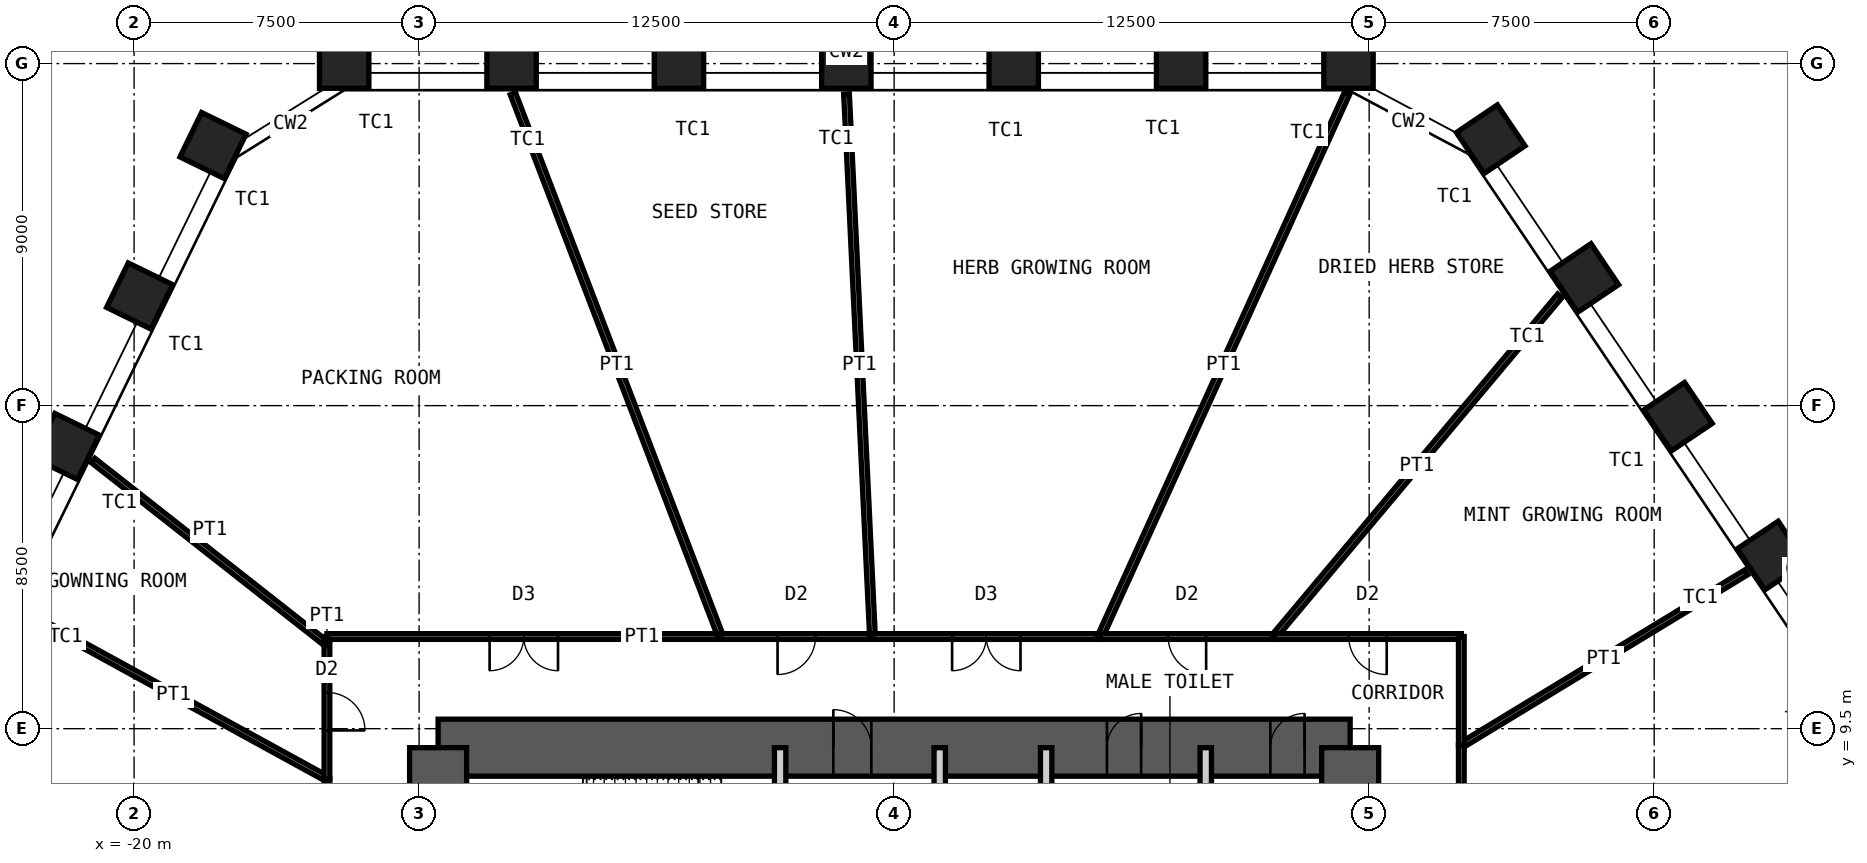
"""IFC4 building model, lengths in metres.
Left out: names, types, materials, properties, quantities, classifications, styles, units other than length and angle.
Written with IfcOpenShell. Run it as: python <this file> out.ifc"""

import sys

from ifc_helpers import new_model, si_unit, direction, frame, frame_2d, origin, origin_2d, place, context, subcontext, project, spatial, rectangle, hollow_rectangle, extrude, element, fill, save


model = new_model("IFC4")
c1 = context("Model", 3, precision=1e-05, world=origin(), true_north=direction((0.0, 1.0)))
c2 = subcontext(c1, "Body", "Model", "MODEL_VIEW")
j1 = project(units=[si_unit("LENGTHUNIT", "METRE"), si_unit("PLANEANGLEUNIT", "RADIAN")], contexts=[c1])
p1 = place(None, origin())
s1 = spatial("IfcSite", under=j1, at=p1, CompositionType="ELEMENT")
p2 = place(p1, origin())
s2 = spatial("IfcBuilding", under=s1, at=p2, CompositionType="ELEMENT")
p3 = place(p2, frame((0.0, 0.0, 52.0)))
s3 = spatial("IfcBuildingStorey", under=s2, at=p3, CompositionType="ELEMENT", Elevation=52.0)
for number, where, z_axis, x_axis in (
    (1, (-14.471, 27.0, 0.0), (0.0, 0.0, 1.0), (-1.0, 0.0, 0.0)),
    (2, (-10.067, 27.0, 0.0), (0.0, 0.0, 1.0), (-1.0, 0.0, 0.0)),
    (3, (-5.662, 27.0, 0.0), (0.0, 0.0, 1.0), (-1.0, 0.0, 0.0)),
    (4, (-1.258, 27.0, 0.0), (0.0, 0.0, 1.0), (-1.0, 0.0, 0.0)),
    (5, (3.147, 27.0, 0.0), (0.0, 0.0, 1.0), (-1.0, 0.0, 0.0)),
    (6, (7.552, 27.0, 0.0), (0.0, 0.0, 1.0), (-1.0, 0.0, 0.0)),
    (7, (11.956, 27.0, 0.0), (0.0, 0.0, 1.0), (-1.0, 0.0, 0.0)),
    (8, (15.698, 25.01, 0.0), (0.0, 0.0, 1.0), (-0.559, 0.829, 0.0)),
    (9, (18.161, 21.359, 0.0), (0.0, 0.0, 1.0), (-0.559, 0.829, 0.0)),
    (10, (20.624, 17.707, 0.0), (0.0, 0.0, 1.0), (-0.559, 0.829, 0.0)),
    (11, (23.087, 14.056, 0.0), (0.0, 0.0, 1.0), (-0.559, 0.829, 0.0)),
    (12, (-21.785, 16.925, 0.0), (0.0, 0.0, 1.0), (-0.438, -0.899, 0.0)),
    (13, (-19.854, 20.884, 0.0), (0.0, 0.0, 1.0), (-0.438, -0.899, 0.0)),
    (14, (-17.924, 24.843, 0.0), (0.0, 0.0, 1.0), (-0.438, -0.899, 0.0)),
):
    element("IfcColumn", number, at=place(p3, frame(where, z_axis=z_axis, x_axis=x_axis)), inside=s3, PredefinedType="COLUMN", context=c2, shape_type="SweptSolid", body=[
        extrude(hollow_rectangle(XDim=1.3, YDim=1.3, WallThickness=0.1, at=origin_2d()), origin(), (0.0, 0.0, 1.0), 5.0),
    ])
p4 = place(p3, frame((-12.0, 9.0, 0.0), z_axis=(0.0, 0.0, 1.0), x_axis=(1.0, 0.0, 0.0)))
e15 = element("IfcWall", 15, at=p4, inside=s3, PredefinedType="SHEAR", context=c2, shape_type="SweptSolid", body=[
    extrude(rectangle(XDim=24.0, YDim=1.5, at=frame_2d((12.0, 0.0))), origin(), (0.0, 0.0, 1.0), 5.0),
])
p5 = place(p4, frame((10.4, 0.0, 0.0)))
e16 = element("IfcOpeningElement", 16, at=p5, cuts=e15, PredefinedType="OPENING", context=c2, shape_type="SweptSolid", body=[
    extrude(rectangle(XDim=1.0, YDim=2.1, at=frame_2d((0.5, 1.05))), frame((0.0, 0.76, 0.0), z_axis=(0.0, -1.0, 0.0), x_axis=(1.0, 0.0, 0.0)), (0.0, 0.0, 1.0), 1.52),
])
p6 = place(p4, frame((17.6, 0.0, 0.0)))
e17 = element("IfcOpeningElement", 17, at=p6, cuts=e15, PredefinedType="OPENING", context=c2, shape_type="SweptSolid", body=[
    extrude(rectangle(XDim=0.9, YDim=2.1, at=frame_2d((0.45, 1.05))), frame((0.0, 0.76, 0.0), z_axis=(0.0, -1.0, 0.0), x_axis=(1.0, 0.0, 0.0)), (0.0, 0.0, 1.0), 1.52),
])
p7 = place(p4, frame((21.9, 0.0, 0.0)))
e18 = element("IfcOpeningElement", 18, at=p7, cuts=e15, PredefinedType="OPENING", context=c2, shape_type="SweptSolid", body=[
    extrude(rectangle(XDim=0.9, YDim=2.1, at=frame_2d((0.45, 1.05))), frame((0.0, 0.76, 0.0), z_axis=(0.0, -1.0, 0.0), x_axis=(1.0, 0.0, 0.0)), (0.0, 0.0, 1.0), 1.52),
])
p8 = place(p3, frame((12.0, -9.0, 0.0), z_axis=(0.0, 0.0, 1.0), x_axis=(0.0, 1.0, 0.0)))
e19 = element("IfcWall", 19, at=p8, inside=s3, PredefinedType="SHEAR", context=c2, shape_type="SweptSolid", body=[
    extrude(rectangle(XDim=18.0, YDim=1.5, at=frame_2d((9.0, 0.0))), origin(), (0.0, 0.0, 1.0), 5.0),
])
p9 = place(p8, frame((8.1, 0.0, 0.0)))
e20 = element("IfcOpeningElement", 20, at=p9, cuts=e19, PredefinedType="OPENING", context=c2, shape_type="SweptSolid", body=[
    extrude(rectangle(XDim=1.8, YDim=2.1, at=frame_2d((0.9, 1.05))), frame((0.0, 0.76, 0.0), z_axis=(0.0, -1.0, 0.0), x_axis=(1.0, 0.0, 0.0)), (0.0, 0.0, 1.0), 1.52),
])
p10 = place(p3, frame((-12.0, -9.0, 0.0), z_axis=(0.0, 0.0, 1.0), x_axis=(0.0, 1.0, 0.0)))
e21 = element("IfcWall", 21, at=p10, inside=s3, PredefinedType="SHEAR", context=c2, shape_type="SweptSolid", body=[
    extrude(rectangle(XDim=18.0, YDim=1.5, at=frame_2d((9.0, 0.0))), origin(), (0.0, 0.0, 1.0), 5.0),
])
p11 = place(p10, frame((8.1, 0.0, 0.0)))
e22 = element("IfcOpeningElement", 22, at=p11, cuts=e21, PredefinedType="OPENING", context=c2, shape_type="SweptSolid", body=[
    extrude(rectangle(XDim=1.8, YDim=2.1, at=frame_2d((0.9, 1.05))), frame((0.0, 0.76, 0.0), z_axis=(0.0, -1.0, 0.0), x_axis=(1.0, 0.0, 0.0)), (0.0, 0.0, 1.0), 1.52),
])
p12 = place(p3, frame((-3.0, 5.15, 0.0), z_axis=(0.0, 0.0, 1.0), x_axis=(0.0, 1.0, 0.0)))
e23 = element("IfcWall", 23, at=p12, inside=s3, PredefinedType="PARTITIONING", context=c2, shape_type="SweptSolid", body=[
    extrude(rectangle(XDim=3.85, YDim=0.3, at=frame_2d((1.925, 0.0))), origin(), (0.0, 0.0, 1.0), 4.78),
])
p13 = place(p12, frame((1.425, 0.0, 0.0)))
e24 = element("IfcOpeningElement", 24, at=p13, cuts=e23, PredefinedType="OPENING", context=c2, shape_type="SweptSolid", body=[
    extrude(rectangle(XDim=1.0, YDim=2.1, at=frame_2d((0.5, 1.05))), frame((0.0, 0.16, 0.0), z_axis=(0.0, -1.0, 0.0), x_axis=(1.0, 0.0, 0.0)), (0.0, 0.0, 1.0), 0.32),
])
p14 = place(p3, frame((1.2, 5.15, 0.0), z_axis=(0.0, 0.0, 1.0), x_axis=(0.0, 1.0, 0.0)))
e25 = element("IfcWall", 25, at=p14, inside=s3, PredefinedType="PARTITIONING", context=c2, shape_type="SweptSolid", body=[
    extrude(rectangle(XDim=3.85, YDim=0.3, at=frame_2d((1.925, 0.0))), origin(), (0.0, 0.0, 1.0), 4.78),
])
p15 = place(p14, frame((1.375, 0.0, 0.0)))
e26 = element("IfcOpeningElement", 26, at=p15, cuts=e25, PredefinedType="OPENING", context=c2, shape_type="SweptSolid", body=[
    extrude(rectangle(XDim=1.1, YDim=2.4, at=frame_2d((0.55, 1.2))), frame((0.0, 0.16, 0.0), z_axis=(0.0, -1.0, 0.0), x_axis=(1.0, 0.0, 0.0)), (0.0, 0.0, 1.0), 0.32),
])
for number, where, z_axis, x_axis in (
    (27, (4.0, 5.15, 0.0), (0.0, 0.0, 1.0), (0.0, 1.0, 0.0)),
    (28, (8.2, 5.15, 0.0), (0.0, 0.0, 1.0), (0.0, 1.0, 0.0)),
):
    element("IfcWall", number, at=place(p3, frame(where, z_axis=z_axis, x_axis=x_axis)), inside=s3, PredefinedType="PARTITIONING", context=c2, shape_type="SweptSolid", body=[
        extrude(rectangle(XDim=3.85, YDim=0.3, at=frame_2d((1.925, 0.0))), origin(), (0.0, 0.0, 1.0), 4.78),
    ])
p16 = place(p3, frame((22.421, 13.612, 0.0), z_axis=(0.0, 0.0, 1.0), x_axis=(-0.854791484761, -0.518971596121, 0.0)))
e29 = element("IfcWall", 29, at=p16, inside=s3, PredefinedType="PARTITIONING", context=c2, shape_type="SweptSolid", body=[
    extrude(rectangle(XDim=8.77, YDim=0.15, at=frame_2d((4.385, 0.0))), origin(), (0.0, 0.0, 1.0), 3.7),
])
p17 = place(p3, frame((14.925, 9.061, 0.0), z_axis=(0.0, 0.0, 1.0), x_axis=(0.0, -1.0, 0.0)))
e30 = element("IfcWall", 30, at=p17, inside=s3, PredefinedType="PARTITIONING", context=c2, shape_type="SweptSolid", body=[
    extrude(rectangle(XDim=11.439, YDim=0.15, at=frame_2d((5.72, 0.0))), origin(), (0.0, 0.0, 1.0), 4.8),
])
p18 = place(p17, frame((4.82, 0.0, 0.0)))
e31 = element("IfcOpeningElement", 31, at=p18, cuts=e30, PredefinedType="OPENING", context=c2, shape_type="SweptSolid", body=[
    extrude(rectangle(XDim=1.8, YDim=2.4, at=frame_2d((0.9, 1.2))), frame((0.0, 0.085, 0.0), z_axis=(0.0, -1.0, 0.0), x_axis=(1.0, 0.0, 0.0)), (0.0, 0.0, 1.0), 0.17),
])
p19 = place(p3, frame((-14.925, -9.596, 0.0), z_axis=(0.0, 0.0, 1.0), x_axis=(0.0, 1.0, 0.0)))
e32 = element("IfcWall", 32, at=p19, inside=s3, PredefinedType="PARTITIONING", context=c2, shape_type="SweptSolid", body=[
    extrude(rectangle(XDim=17.78, YDim=0.15, at=frame_2d((8.89, 0.0))), origin(), (0.0, 0.0, 1.0), 4.8),
])
p20 = place(p19, frame((7.99, 0.0, 0.0)))
e33 = element("IfcOpeningElement", 33, at=p20, cuts=e32, PredefinedType="OPENING", context=c2, shape_type="SweptSolid", body=[
    extrude(rectangle(XDim=1.8, YDim=2.4, at=frame_2d((0.9, 1.2))), frame((0.0, 0.085, 0.0), z_axis=(0.0, -1.0, 0.0), x_axis=(1.0, 0.0, 0.0)), (0.0, 0.0, 1.0), 0.17),
])
p21 = place(p3, frame((-22.999, 12.612, 0.0), z_axis=(0.0, 0.0, 1.0), x_axis=(0.876826470608, -0.480806967963, 0.0)))
e34 = element("IfcWall", 34, at=p21, inside=s3, PredefinedType="PARTITIONING", context=c2, shape_type="SweptSolid", body=[
    extrude(rectangle(XDim=9.208, YDim=0.15, at=frame_2d((4.604, 0.0))), origin(), (0.0, 0.0, 1.0), 3.7),
])
p22 = place(p3, frame((-14.925, 8.184, 0.0), z_axis=(0.0, 0.0, 1.0), x_axis=(0.0, 1.0, 0.0)))
e35 = element("IfcWall", 35, at=p22, inside=s3, PredefinedType="PARTITIONING", context=c2, shape_type="SweptSolid", body=[
    extrude(rectangle(XDim=3.54, YDim=0.15, at=frame_2d((1.77, 0.0))), origin(), (0.0, 0.0, 1.0), 4.8),
])
p23 = place(p22, frame((1.27, 0.0, 0.0)))
e36 = element("IfcOpeningElement", 36, at=p23, cuts=e35, PredefinedType="OPENING", context=c2, shape_type="SweptSolid", body=[
    extrude(rectangle(XDim=1.0, YDim=2.4, at=frame_2d((0.5, 1.2))), frame((0.0, 0.085, 0.0), z_axis=(0.0, -1.0, 0.0), x_axis=(1.0, 0.0, 0.0)), (0.0, 0.0, 1.0), 0.17),
])
p24 = place(p3, frame((-21.077, 16.557, 0.0), z_axis=(0.0, 0.0, 1.0), x_axis=(0.78639413325, -0.617725074115, 0.0)))
e37 = element("IfcWall", 37, at=p24, inside=s3, PredefinedType="PARTITIONING", context=c2, shape_type="SweptSolid", body=[
    extrude(rectangle(XDim=7.823, YDim=0.15, at=frame_2d((3.912, 0.0))), origin(), (0.0, 0.0, 1.0), 3.7),
])
p25 = place(p3, frame((-14.925, 11.819, 0.0), z_axis=(0.0, 0.0, 1.0), x_axis=(0.0, 1.0, 0.0)))
e38 = element("IfcWall", 38, at=p25, inside=s3, PredefinedType="PARTITIONING", context=c2, shape_type="SweptSolid", body=[
    extrude(rectangle(XDim=0.106, YDim=0.15, at=frame_2d((0.053, 0.0))), origin(), (0.0, 0.0, 1.0), 4.8),
])
p26 = place(p3, frame((-14.925, 11.925, 0.0), z_axis=(0.0, 0.0, 1.0), x_axis=(1.0, 0.0, 0.0)))
e39 = element("IfcWall", 39, at=p26, inside=s3, PredefinedType="PARTITIONING", context=c2, shape_type="SweptSolid", body=[
    extrude(rectangle(XDim=10.361, YDim=0.15, at=frame_2d((5.18, 0.0))), origin(), (0.0, 0.0, 1.0), 4.8),
])
p27 = place(p26, frame((4.28, 0.0, 0.0)))
e40 = element("IfcOpeningElement", 40, at=p27, cuts=e39, PredefinedType="OPENING", context=c2, shape_type="SweptSolid", body=[
    extrude(rectangle(XDim=1.8, YDim=2.4, at=frame_2d((0.9, 1.2))), frame((0.0, 0.085, 0.0), z_axis=(0.0, -1.0, 0.0), x_axis=(1.0, 0.0, 0.0)), (0.0, 0.0, 1.0), 0.17),
])
p28 = place(p3, frame((-10.031, 26.207, 0.0), z_axis=(0.0, 0.0, 1.0), x_axis=(0.357478701909, -0.933921290946, 0.0)))
e41 = element("IfcWall", 41, at=p28, inside=s3, PredefinedType="PARTITIONING", context=c2, shape_type="SweptSolid", body=[
    extrude(rectangle(XDim=15.292, YDim=0.15, at=frame_2d((7.646, 0.0))), origin(), (0.0, 0.0, 1.0), 3.7),
])
p29 = place(p3, frame((-4.564, 11.925, 0.0), z_axis=(0.0, 0.0, 1.0), x_axis=(1.0, 0.0, 0.0)))
e42 = element("IfcWall", 42, at=p29, inside=s3, PredefinedType="PARTITIONING", context=c2, shape_type="SweptSolid", body=[
    extrude(rectangle(XDim=3.994, YDim=0.15, at=frame_2d((1.997, 0.0))), origin(), (0.0, 0.0, 1.0), 4.8),
])
p30 = place(p29, frame((1.497, 0.0, 0.0)))
e43 = element("IfcOpeningElement", 43, at=p30, cuts=e42, PredefinedType="OPENING", context=c2, shape_type="SweptSolid", body=[
    extrude(rectangle(XDim=1.0, YDim=2.4, at=frame_2d((0.5, 1.2))), frame((0.0, 0.085, 0.0), z_axis=(0.0, -1.0, 0.0), x_axis=(1.0, 0.0, 0.0)), (0.0, 0.0, 1.0), 0.17),
])
p31 = place(p3, frame((-1.253, 26.2, 0.0), z_axis=(0.0, 0.0, 1.0), x_axis=(0.047763998943, -0.998858648861, 0.0)))
e44 = element("IfcWall", 44, at=p31, inside=s3, PredefinedType="PARTITIONING", context=c2, shape_type="SweptSolid", body=[
    extrude(rectangle(XDim=14.292, YDim=0.15, at=frame_2d((7.146, 0.0))), origin(), (0.0, 0.0, 1.0), 3.7),
])
p32 = place(p3, frame((-0.57, 11.925, 0.0), z_axis=(0.0, 0.0, 1.0), x_axis=(1.0, 0.0, 0.0)))
e45 = element("IfcWall", 45, at=p32, inside=s3, PredefinedType="PARTITIONING", context=c2, shape_type="SweptSolid", body=[
    extrude(rectangle(XDim=5.991, YDim=0.15, at=frame_2d((2.996, 0.0))), origin(), (0.0, 0.0, 1.0), 4.8),
])
p33 = place(p32, frame((2.096, 0.0, 0.0)))
e46 = element("IfcOpeningElement", 46, at=p33, cuts=e45, PredefinedType="OPENING", context=c2, shape_type="SweptSolid", body=[
    extrude(rectangle(XDim=1.8, YDim=2.4, at=frame_2d((0.9, 1.2))), frame((0.0, 0.085, 0.0), z_axis=(0.0, -1.0, 0.0), x_axis=(1.0, 0.0, 0.0)), (0.0, 0.0, 1.0), 0.17),
])
p34 = place(p3, frame((11.915, 26.209, 0.0), z_axis=(0.0, 0.0, 1.0), x_axis=(-0.4138533524, -0.910343563007, 0.0)))
e47 = element("IfcWall", 47, at=p34, inside=s3, PredefinedType="PARTITIONING", context=c2, shape_type="SweptSolid", body=[
    extrude(rectangle(XDim=15.691, YDim=0.15, at=frame_2d((7.845, 0.0))), origin(), (0.0, 0.0, 1.0), 3.7),
])
p35 = place(p3, frame((5.421, 11.925, 0.0), z_axis=(0.0, 0.0, 1.0), x_axis=(1.0, 0.0, 0.0)))
e48 = element("IfcWall", 48, at=p35, inside=s3, PredefinedType="PARTITIONING", context=c2, shape_type="SweptSolid", body=[
    extrude(rectangle(XDim=4.578, YDim=0.15, at=frame_2d((2.289, 0.0))), origin(), (0.0, 0.0, 1.0), 4.8),
])
p36 = place(p35, frame((1.789, 0.0, 0.0)))
e49 = element("IfcOpeningElement", 49, at=p36, cuts=e48, PredefinedType="OPENING", context=c2, shape_type="SweptSolid", body=[
    extrude(rectangle(XDim=1.0, YDim=2.4, at=frame_2d((0.5, 1.2))), frame((0.0, 0.085, 0.0), z_axis=(0.0, -1.0, 0.0), x_axis=(1.0, 0.0, 0.0)), (0.0, 0.0, 1.0), 0.17),
])
p37 = place(p3, frame((17.517, 20.891, 0.0), z_axis=(0.0, 0.0, 1.0), x_axis=(-0.642515050703, -0.766273064658, 0.0)))
e50 = element("IfcWall", 50, at=p37, inside=s3, PredefinedType="PARTITIONING", context=c2, shape_type="SweptSolid", body=[
    extrude(rectangle(XDim=11.7, YDim=0.15, at=frame_2d((5.85, 0.0))), origin(), (0.0, 0.0, 1.0), 3.7),
])
p38 = place(p3, frame((9.999, 11.925, 0.0), z_axis=(0.0, 0.0, 1.0), x_axis=(1.0, 0.0, 0.0)))
e51 = element("IfcWall", 51, at=p38, inside=s3, PredefinedType="PARTITIONING", context=c2, shape_type="SweptSolid", body=[
    extrude(rectangle(XDim=4.926, YDim=0.15, at=frame_2d((2.463, 0.0))), origin(), (0.0, 0.0, 1.0), 4.8),
])
p39 = place(p38, frame((1.963, 0.0, 0.0)))
e52 = element("IfcOpeningElement", 52, at=p39, cuts=e51, PredefinedType="OPENING", context=c2, shape_type="SweptSolid", body=[
    extrude(rectangle(XDim=1.0, YDim=2.4, at=frame_2d((0.5, 1.2))), frame((0.0, 0.085, 0.0), z_axis=(0.0, -1.0, 0.0), x_axis=(1.0, 0.0, 0.0)), (0.0, 0.0, 1.0), 0.17),
])
p40 = place(p3, frame((14.925, 11.925, 0.0), z_axis=(0.0, 0.0, 1.0), x_axis=(0.0, -1.0, 0.0)))
e53 = element("IfcWall", 53, at=p40, inside=s3, PredefinedType="PARTITIONING", context=c2, shape_type="SweptSolid", body=[
    extrude(rectangle(XDim=2.864, YDim=0.15, at=frame_2d((1.432, 0.0))), origin(), (0.0, 0.0, 1.0), 4.8),
])
p41 = place(p5, origin())
e54 = element("IfcDoor", 54, at=p41, inside=s3, OperationType="SINGLE_SWING_RIGHT", PredefinedType="DOOR", context=c2, shape_type="SweptSolid", body=[
    extrude(rectangle(XDim=1.0, YDim=2.1, at=frame_2d((0.5, 1.05))), frame((0.0, 0.025, 0.0), z_axis=(0.0, -1.0, 0.0), x_axis=(1.0, 0.0, 0.0)), (0.0, 0.0, 1.0), 0.05),
])
fill(e16, e54)
p42 = place(p6, origin())
e55 = element("IfcDoor", 55, at=p42, inside=s3, OperationType="SINGLE_SWING_LEFT", PredefinedType="DOOR", context=c2, shape_type="SweptSolid", body=[
    extrude(rectangle(XDim=0.9, YDim=2.1, at=frame_2d((0.45, 1.05))), frame((0.0, 0.025, 0.0), z_axis=(0.0, -1.0, 0.0), x_axis=(1.0, 0.0, 0.0)), (0.0, 0.0, 1.0), 0.05),
])
fill(e17, e55)
p43 = place(p7, origin())
e56 = element("IfcDoor", 56, at=p43, inside=s3, OperationType="SINGLE_SWING_LEFT", PredefinedType="DOOR", context=c2, shape_type="SweptSolid", body=[
    extrude(rectangle(XDim=0.9, YDim=2.1, at=frame_2d((0.45, 1.05))), frame((0.0, 0.025, 0.0), z_axis=(0.0, -1.0, 0.0), x_axis=(1.0, 0.0, 0.0)), (0.0, 0.0, 1.0), 0.05),
])
fill(e18, e56)
p44 = place(p23, origin())
e57 = element("IfcDoor", 57, at=p44, inside=s3, OperationType="SINGLE_SWING_LEFT", PredefinedType="DOOR", context=c2, shape_type="SweptSolid", body=[
    extrude(rectangle(XDim=1.0, YDim=2.4, at=frame_2d((0.5, 1.2))), frame((0.0, 0.025, 0.0), z_axis=(0.0, -1.0, 0.0), x_axis=(1.0, 0.0, 0.0)), (0.0, 0.0, 1.0), 0.05),
])
fill(e36, e57)
p45 = place(p27, origin())
e58 = element("IfcDoor", 58, at=p45, inside=s3, OperationType="DOUBLE_DOOR_DOUBLE_SWING", PredefinedType="DOOR", context=c2, shape_type="SweptSolid", body=[
    extrude(rectangle(XDim=1.8, YDim=2.4, at=frame_2d((0.9, 1.2))), frame((0.0, 0.025, 0.0), z_axis=(0.0, -1.0, 0.0), x_axis=(1.0, 0.0, 0.0)), (0.0, 0.0, 1.0), 0.05),
])
fill(e40, e58)
p46 = place(p30, origin())
e59 = element("IfcDoor", 59, at=p46, inside=s3, OperationType="SINGLE_SWING_LEFT", PredefinedType="DOOR", context=c2, shape_type="SweptSolid", body=[
    extrude(rectangle(XDim=1.0, YDim=2.4, at=frame_2d((0.5, 1.2))), frame((0.0, 0.025, 0.0), z_axis=(0.0, -1.0, 0.0), x_axis=(1.0, 0.0, 0.0)), (0.0, 0.0, 1.0), 0.05),
])
fill(e43, e59)
p47 = place(p33, origin())
e60 = element("IfcDoor", 60, at=p47, inside=s3, OperationType="DOUBLE_DOOR_DOUBLE_SWING", PredefinedType="DOOR", context=c2, shape_type="SweptSolid", body=[
    extrude(rectangle(XDim=1.8, YDim=2.4, at=frame_2d((0.9, 1.2))), frame((0.0, 0.025, 0.0), z_axis=(0.0, -1.0, 0.0), x_axis=(1.0, 0.0, 0.0)), (0.0, 0.0, 1.0), 0.05),
])
fill(e46, e60)
p48 = place(p36, origin())
e61 = element("IfcDoor", 61, at=p48, inside=s3, OperationType="SINGLE_SWING_RIGHT", PredefinedType="DOOR", context=c2, shape_type="SweptSolid", body=[
    extrude(rectangle(XDim=1.0, YDim=2.4, at=frame_2d((0.5, 1.2))), frame((0.0, 0.025, 0.0), z_axis=(0.0, -1.0, 0.0), x_axis=(1.0, 0.0, 0.0)), (0.0, 0.0, 1.0), 0.05),
])
fill(e49, e61)
p49 = place(p39, origin())
e62 = element("IfcDoor", 62, at=p49, inside=s3, OperationType="SINGLE_SWING_RIGHT", PredefinedType="DOOR", context=c2, shape_type="SweptSolid", body=[
    extrude(rectangle(XDim=1.0, YDim=2.4, at=frame_2d((0.5, 1.2))), frame((0.0, 0.025, 0.0), z_axis=(0.0, -1.0, 0.0), x_axis=(1.0, 0.0, 0.0)), (0.0, 0.0, 1.0), 0.05),
])
fill(e52, e62)
save(model, sys.argv[1])
